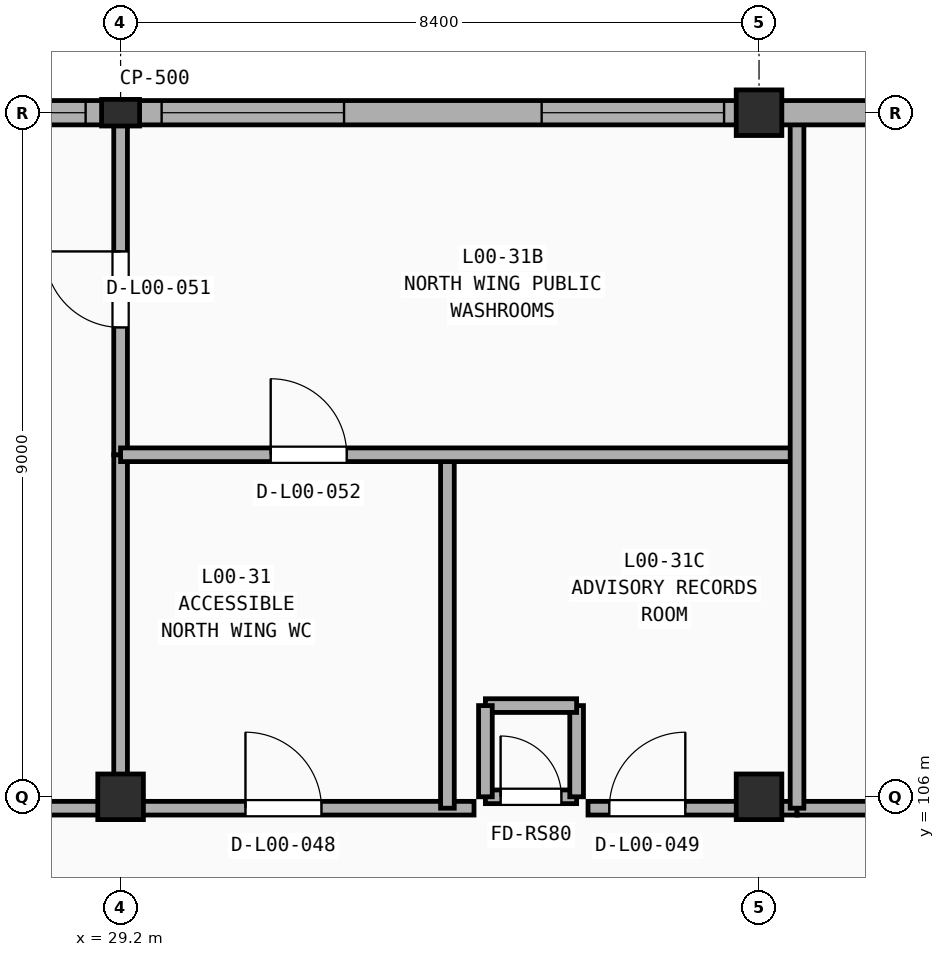
"""IFC4 building model, lengths in metres.
Left out: names, types, materials, properties, quantities, classifications, styles, units other than length and angle.
Written with IfcOpenShell. Run it as: python <this file> out.ifc"""

import sys

from ifc_helpers import new_model, si_unit, direction, frame, frame_2d, origin, origin_2d, place, context, subcontext, project, spatial, rectangle, extrude, element, fill, save


model = new_model("IFC4")
c1 = context("Model", 3, precision=1e-05, world=origin(), true_north=direction((0.0, 1.0)))
c2 = subcontext(c1, "Body", "Model", "MODEL_VIEW")
j1 = project(units=[si_unit("LENGTHUNIT", "METRE"), si_unit("PLANEANGLEUNIT", "RADIAN")], contexts=[c1])
p1 = place(None, origin())
s1 = spatial("IfcSite", under=j1, at=p1, CompositionType="ELEMENT")
p2 = place(p1, origin())
s2 = spatial("IfcBuilding", under=s1, at=p2, CompositionType="ELEMENT")
p3 = place(p2, origin())
s3 = spatial("IfcBuildingStorey", under=s2, at=p3, CompositionType="ELEMENT", Elevation=0.0)
p4 = place(p3, frame((29.2, 106.0, 0.0), z_axis=(0.0, 0.0, 1.0), x_axis=(1.0, 0.0, 0.0)))
e1 = element("IfcColumn", 1, at=p4, inside=s3, PredefinedType="COLUMN", context=c2, shape_type="SweptSolid", body=[
    extrude(rectangle(XDim=0.6, YDim=0.6, at=origin_2d()), origin(), (0.0, 0.0, 1.0), 5.4),
])
p5 = place(p3, frame((29.2, 115.0, 0.0), z_axis=(0.0, 0.0, 1.0), x_axis=(1.0, 0.0, 0.0)))
e2 = element("IfcColumn", 2, at=p5, inside=s3, PredefinedType="PILASTER", context=c2, shape_type="SweptSolid", body=[
    extrude(rectangle(XDim=0.5, YDim=0.35, at=origin_2d()), origin(), (0.0, 0.0, 1.0), 5.4),
])
for number, where, z_axis, x_axis in (
    (3, (37.6, 106.0, 0.0), (0.0, 0.0, 1.0), (1.0, 0.0, 0.0)),
    (4, (37.6, 115.0, 0.0), (0.0, 0.0, 1.0), (1.0, 0.0, 0.0)),
):
    element("IfcColumn", number, at=place(p3, frame(where, z_axis=z_axis, x_axis=x_axis)), inside=s3, PredefinedType="COLUMN", context=c2, shape_type="SweptSolid", body=[
        extrude(rectangle(XDim=0.6, YDim=0.6, at=origin_2d()), origin(), (0.0, 0.0, 1.0), 5.4),
    ])
p6 = place(p3, frame((4.15, 105.85, 0.0), z_axis=(0.0, 0.0, 1.0), x_axis=(1.0, 0.0, 0.0)))
e5 = element("IfcWall", 5, at=p6, inside=s3, PredefinedType="PARTITIONING", context=c2, shape_type="SweptSolid", body=[
    extrude(rectangle(XDim=25.05, YDim=0.18, at=frame_2d((12.525, 0.0))), origin(), (0.0, 0.0, 1.0), 4.54),
])
p7 = place(p6, frame((10.822, 0.0, -0.01)))
e6 = element("IfcOpeningElement", 6, at=p7, cuts=e5, PredefinedType="OPENING", context=c2, shape_type="SweptSolid", body=[
    extrude(rectangle(XDim=1.0, YDim=2.16, at=frame_2d((0.5, 1.08))), frame((0.0, 0.1, 0.0), z_axis=(0.0, -1.0, 0.0), x_axis=(1.0, 0.0, 0.0)), (0.0, 0.0, 1.0), 0.2),
])
p8 = place(p3, frame((29.2, 105.85, 0.0), z_axis=(0.0, 0.0, 1.0), x_axis=(1.0, 0.0, 0.0)))
e7 = element("IfcWall", 7, at=p8, inside=s3, PredefinedType="PARTITIONING", context=c2, shape_type="SweptSolid", body=[
    extrude(rectangle(XDim=4.65, YDim=0.18, at=frame_2d((2.325, 0.0))), origin(), (0.0, 0.0, 1.0), 4.54),
])
p9 = place(p8, frame((1.643, 0.0, -0.01)))
e8 = element("IfcOpeningElement", 8, at=p9, cuts=e7, PredefinedType="OPENING", context=c2, shape_type="SweptSolid", body=[
    extrude(rectangle(XDim=1.0, YDim=2.16, at=frame_2d((0.5, 1.08))), frame((0.0, 0.1, 0.0), z_axis=(0.0, -1.0, 0.0), x_axis=(1.0, 0.0, 0.0)), (0.0, 0.0, 1.0), 0.2),
])
p10 = place(p3, frame((35.35, 105.85, 0.0), z_axis=(0.0, 0.0, 1.0), x_axis=(1.0, 0.0, 0.0)))
e9 = element("IfcWall", 9, at=p10, inside=s3, PredefinedType="PARTITIONING", context=c2, shape_type="SweptSolid", body=[
    extrude(rectangle(XDim=2.75, YDim=0.18, at=frame_2d((1.375, 0.0))), origin(), (0.0, 0.0, 1.0), 4.54),
])
p11 = place(p10, frame((0.28, 0.0, -0.01)))
e10 = element("IfcOpeningElement", 10, at=p11, cuts=e9, PredefinedType="OPENING", context=c2, shape_type="SweptSolid", body=[
    extrude(rectangle(XDim=1.0, YDim=2.16, at=frame_2d((0.5, 1.08))), frame((0.0, 0.1, 0.0), z_axis=(0.0, -1.0, 0.0), x_axis=(1.0, 0.0, 0.0)), (0.0, 0.0, 1.0), 0.2),
])
p12 = place(p3, frame((38.1, 105.85, 0.0), z_axis=(0.0, 0.0, 1.0), x_axis=(1.0, 0.0, 0.0)))
e11 = element("IfcWall", 11, at=p12, inside=s3, PredefinedType="PARTITIONING", context=c2, shape_type="SweptSolid", body=[
    extrude(rectangle(XDim=13.9, YDim=0.18, at=frame_2d((6.95, 0.0))), origin(), (0.0, 0.0, 1.0), 4.54),
])
p13 = place(p12, frame((5.805, 0.0, -0.01)))
e12 = element("IfcOpeningElement", 12, at=p13, cuts=e11, PredefinedType="OPENING", context=c2, shape_type="SweptSolid", body=[
    extrude(rectangle(XDim=1.0, YDim=2.16, at=frame_2d((0.5, 1.08))), frame((0.0, 0.1, 0.0), z_axis=(0.0, -1.0, 0.0), x_axis=(1.0, 0.0, 0.0)), (0.0, 0.0, 1.0), 0.2),
])
p14 = place(p3, frame((29.2, 105.85, 0.0), z_axis=(0.0, 0.0, 1.0), x_axis=(0.0, 1.0, 0.0)))
e13 = element("IfcWall", 13, at=p14, inside=s3, PredefinedType="PARTITIONING", context=c2, shape_type="SweptSolid", body=[
    extrude(rectangle(XDim=4.65, YDim=0.18, at=frame_2d((2.325, 0.0))), origin(), (0.0, 0.0, 1.0), 4.54),
])
p15 = place(p3, frame((29.2, 110.5, 0.0), z_axis=(0.0, 0.0, 1.0), x_axis=(0.0, 1.0, 0.0)))
e14 = element("IfcWall", 14, at=p15, inside=s3, PredefinedType="PARTITIONING", context=c2, shape_type="SweptSolid", body=[
    extrude(rectangle(XDim=4.35, YDim=0.18, at=frame_2d((2.175, 0.0))), origin(), (0.0, 0.0, 1.0), 4.64),
])
p16 = place(p15, frame((1.675, 0.0, -0.01)))
e15 = element("IfcOpeningElement", 15, at=p16, cuts=e14, PredefinedType="OPENING", context=c2, shape_type="SweptSolid", body=[
    extrude(rectangle(XDim=1.0, YDim=2.16, at=frame_2d((0.5, 1.08))), frame((0.0, 0.1, 0.0), z_axis=(0.0, -1.0, 0.0), x_axis=(1.0, 0.0, 0.0)), (0.0, 0.0, 1.0), 0.2),
])
p17 = place(p3, frame((33.5, 105.85, 0.0), z_axis=(0.0, 0.0, 1.0), x_axis=(0.0, 1.0, 0.0)))
e16 = element("IfcWall", 16, at=p17, inside=s3, PredefinedType="PARTITIONING", context=c2, shape_type="SweptSolid", body=[
    extrude(rectangle(XDim=4.65, YDim=0.18, at=frame_2d((2.325, 0.0))), origin(), (0.0, 0.0, 1.0), 5.04),
])
p18 = place(p3, frame((29.2, 110.5, 0.0), z_axis=(0.0, 0.0, 1.0), x_axis=(1.0, 0.0, 0.0)))
e17 = element("IfcWall", 17, at=p18, inside=s3, PredefinedType="PARTITIONING", context=c2, shape_type="SweptSolid", body=[
    extrude(rectangle(XDim=8.9, YDim=0.18, at=frame_2d((4.45, 0.0))), origin(), (0.0, 0.0, 1.0), 4.64),
])
p19 = place(p18, frame((1.975, 0.0, -0.01)))
e18 = element("IfcOpeningElement", 18, at=p19, cuts=e17, PredefinedType="OPENING", context=c2, shape_type="SweptSolid", body=[
    extrude(rectangle(XDim=1.0, YDim=2.16, at=frame_2d((0.5, 1.08))), frame((0.0, 0.1, 0.0), z_axis=(0.0, -1.0, 0.0), x_axis=(1.0, 0.0, 0.0)), (0.0, 0.0, 1.0), 0.2),
])
p20 = place(p3, frame((38.1, 105.85, 0.0), z_axis=(0.0, 0.0, 1.0), x_axis=(0.0, 1.0, 0.0)))
e19 = element("IfcWall", 19, at=p20, inside=s3, PredefinedType="PARTITIONING", context=c2, shape_type="SweptSolid", body=[
    extrude(rectangle(XDim=9.0, YDim=0.18, at=frame_2d((4.5, 0.0))), origin(), (0.0, 0.0, 1.0), 4.54),
])
p21 = place(p3, frame((29.2, 115.0, 0.0), z_axis=(0.0, 0.0, 1.0), x_axis=(-1.0, 0.0, 0.0)))
e20 = element("IfcWall", 20, at=p21, inside=s3, PredefinedType="SOLIDWALL", context=c2, shape_type="SweptSolid", body=[
    extrude(rectangle(XDim=8.4, YDim=0.32, at=frame_2d((4.2, 0.0))), origin(), (0.0, 0.0, 1.0), 4.64),
])
p22 = place(p21, frame((0.46, 0.0, 0.9)))
e21 = element("IfcOpeningElement", 21, at=p22, cuts=e20, PredefinedType="OPENING", context=c2, shape_type="SweptSolid", body=[
    extrude(rectangle(XDim=2.4, YDim=2.35, at=frame_2d((1.2, 1.175))), frame((0.0, 0.17, 0.0), z_axis=(0.0, -1.0, 0.0), x_axis=(1.0, 0.0, 0.0)), (0.0, 0.0, 1.0), 0.34),
])
p23 = place(p21, frame((5.46, 0.0, 0.9)))
e22 = element("IfcOpeningElement", 22, at=p23, cuts=e20, PredefinedType="OPENING", context=c2, shape_type="SweptSolid", body=[
    extrude(rectangle(XDim=2.4, YDim=2.35, at=frame_2d((1.2, 1.175))), frame((0.0, 0.17, 0.0), z_axis=(0.0, -1.0, 0.0), x_axis=(1.0, 0.0, 0.0)), (0.0, 0.0, 1.0), 0.34),
])
p24 = place(p3, frame((37.6, 115.0, 0.0), z_axis=(0.0, 0.0, 1.0), x_axis=(-1.0, 0.0, 0.0)))
e23 = element("IfcWall", 23, at=p24, inside=s3, PredefinedType="SOLIDWALL", context=c2, shape_type="SweptSolid", body=[
    extrude(rectangle(XDim=8.4, YDim=0.32, at=frame_2d((4.2, 0.0))), origin(), (0.0, 0.0, 1.0), 4.64),
])
p25 = place(p24, frame((0.46, 0.0, 0.9)))
e24 = element("IfcOpeningElement", 24, at=p25, cuts=e23, PredefinedType="OPENING", context=c2, shape_type="SweptSolid", body=[
    extrude(rectangle(XDim=2.4, YDim=2.35, at=frame_2d((1.2, 1.175))), frame((0.0, 0.17, 0.0), z_axis=(0.0, -1.0, 0.0), x_axis=(1.0, 0.0, 0.0)), (0.0, 0.0, 1.0), 0.34),
])
p26 = place(p24, frame((5.46, 0.0, 0.9)))
e25 = element("IfcOpeningElement", 25, at=p26, cuts=e23, PredefinedType="OPENING", context=c2, shape_type="SweptSolid", body=[
    extrude(rectangle(XDim=2.4, YDim=2.35, at=frame_2d((1.2, 1.175))), frame((0.0, 0.17, 0.0), z_axis=(0.0, -1.0, 0.0), x_axis=(1.0, 0.0, 0.0)), (0.0, 0.0, 1.0), 0.34),
])
p27 = place(p3, frame((46.0, 115.0, 0.0), z_axis=(0.0, 0.0, 1.0), x_axis=(-1.0, 0.0, 0.0)))
e26 = element("IfcWall", 26, at=p27, inside=s3, PredefinedType="SOLIDWALL", context=c2, shape_type="SweptSolid", body=[
    extrude(rectangle(XDim=8.4, YDim=0.32, at=frame_2d((4.2, 0.0))), origin(), (0.0, 0.0, 1.0), 4.64),
])
p28 = place(p27, frame((3.2, 0.0, -0.01)))
e27 = element("IfcOpeningElement", 27, at=p28, cuts=e26, PredefinedType="OPENING", context=c2, shape_type="SweptSolid", body=[
    extrude(rectangle(XDim=2.0, YDim=2.41, at=frame_2d((1.0, 1.205))), frame((0.0, 0.17, 0.0), z_axis=(0.0, -1.0, 0.0), x_axis=(1.0, 0.0, 0.0)), (0.0, 0.0, 1.0), 0.34),
])
p29 = place(p3, frame((34.0, 106.0, 0.0), z_axis=(0.0, 0.0, 1.0), x_axis=(1.0, 0.0, 0.0)))
e28 = element("IfcWall", 28, at=p29, inside=s3, PredefinedType="SOLIDWALL", context=c2, shape_type="SweptSolid", body=[
    extrude(rectangle(XDim=1.2, YDim=0.18, at=frame_2d((0.6, 0.0))), origin(), (0.0, 0.0, 1.0), 5.07),
])
p30 = place(p29, frame((0.2, 0.0, -0.01)))
e29 = element("IfcOpeningElement", 29, at=p30, cuts=e28, PredefinedType="OPENING", context=c2, shape_type="SweptSolid", body=[
    extrude(rectangle(XDim=0.8, YDim=2.06, at=frame_2d((0.4, 1.03))), frame((0.0, 0.1, 0.0), z_axis=(0.0, -1.0, 0.0), x_axis=(1.0, 0.0, 0.0)), (0.0, 0.0, 1.0), 0.2),
])
for number, where, z_axis, x_axis in (
    (30, (35.2, 106.0, 0.0), (0.0, 0.0, 1.0), (0.0, 1.0, 0.0)),
    (31, (35.2, 107.2, 0.0), (0.0, 0.0, 1.0), (-1.0, 0.0, 0.0)),
    (32, (34.0, 107.2, 0.0), (0.0, 0.0, 1.0), (0.0, -1.0, 0.0)),
):
    element("IfcWall", number, at=place(p3, frame(where, z_axis=z_axis, x_axis=x_axis)), inside=s3, PredefinedType="SOLIDWALL", context=c2, shape_type="SweptSolid", body=[
        extrude(rectangle(XDim=1.2, YDim=0.18, at=frame_2d((0.6, 0.0))), origin(), (0.0, 0.0, 1.0), 5.07),
    ])
p31 = place(p9, frame((1.0, 0.0, 0.01), z_axis=(0.0, 0.0, 1.0), x_axis=(-1.0, 0.0, 0.0)))
e33 = element("IfcDoor", 33, at=p31, inside=s3, OperationType="SINGLE_SWING_LEFT", PredefinedType="DOOR", context=c2, shape_type="SweptSolid", body=[
    extrude(rectangle(XDim=1.0, YDim=2.15, at=frame_2d((0.5, 1.075))), frame((0.0, 0.025, 0.0), z_axis=(0.0, -1.0, 0.0), x_axis=(1.0, 0.0, 0.0)), (0.0, 0.0, 1.0), 0.05),
])
fill(e8, e33)
p32 = place(p11, frame((0.0, 0.0, 0.01)))
e34 = element("IfcDoor", 34, at=p32, inside=s3, OperationType="SINGLE_SWING_RIGHT", PredefinedType="DOOR", context=c2, shape_type="SweptSolid", body=[
    extrude(rectangle(XDim=1.0, YDim=2.15, at=frame_2d((0.5, 1.075))), frame((0.0, 0.025, 0.0), z_axis=(0.0, -1.0, 0.0), x_axis=(1.0, 0.0, 0.0)), (0.0, 0.0, 1.0), 0.05),
])
fill(e10, e34)
p33 = place(p16, frame((1.0, 0.0, 0.01), z_axis=(0.0, 0.0, 1.0), x_axis=(-1.0, 0.0, 0.0)))
e35 = element("IfcDoor", 35, at=p33, inside=s3, OperationType="SINGLE_SWING_RIGHT", PredefinedType="DOOR", context=c2, shape_type="SweptSolid", body=[
    extrude(rectangle(XDim=1.0, YDim=2.15, at=frame_2d((0.5, 1.075))), frame((0.0, 0.025, 0.0), z_axis=(0.0, -1.0, 0.0), x_axis=(1.0, 0.0, 0.0)), (0.0, 0.0, 1.0), 0.05),
])
fill(e15, e35)
p34 = place(p19, frame((0.0, 0.0, 0.01)))
e36 = element("IfcDoor", 36, at=p34, inside=s3, OperationType="SINGLE_SWING_LEFT", PredefinedType="DOOR", context=c2, shape_type="SweptSolid", body=[
    extrude(rectangle(XDim=1.0, YDim=2.15, at=frame_2d((0.5, 1.075))), frame((0.0, 0.025, 0.0), z_axis=(0.0, -1.0, 0.0), x_axis=(1.0, 0.0, 0.0)), (0.0, 0.0, 1.0), 0.05),
])
fill(e18, e36)
p35 = place(p22, origin())
e37 = element("IfcWindow", 37, at=p35, inside=s3, PartitioningType="TRIPLE_PANEL_VERTICAL", PredefinedType="WINDOW", context=c2, shape_type="SweptSolid", body=[
    extrude(rectangle(XDim=2.4, YDim=2.35, at=frame_2d((1.2, 1.175))), frame((0.0, 0.03, 0.0), z_axis=(0.0, -1.0, 0.0), x_axis=(1.0, 0.0, 0.0)), (0.0, 0.0, 1.0), 0.06),
])
fill(e21, e37)
p36 = place(p25, origin())
e38 = element("IfcWindow", 38, at=p36, inside=s3, PartitioningType="TRIPLE_PANEL_VERTICAL", PredefinedType="WINDOW", context=c2, shape_type="SweptSolid", body=[
    extrude(rectangle(XDim=2.4, YDim=2.35, at=frame_2d((1.2, 1.175))), frame((0.0, 0.03, 0.0), z_axis=(0.0, -1.0, 0.0), x_axis=(1.0, 0.0, 0.0)), (0.0, 0.0, 1.0), 0.06),
])
fill(e24, e38)
p37 = place(p26, origin())
e39 = element("IfcWindow", 39, at=p37, inside=s3, PartitioningType="TRIPLE_PANEL_VERTICAL", PredefinedType="WINDOW", context=c2, shape_type="SweptSolid", body=[
    extrude(rectangle(XDim=2.4, YDim=2.35, at=frame_2d((1.2, 1.175))), frame((0.0, 0.03, 0.0), z_axis=(0.0, -1.0, 0.0), x_axis=(1.0, 0.0, 0.0)), (0.0, 0.0, 1.0), 0.06),
])
fill(e25, e39)
p38 = place(p30, frame((0.0, 0.0, 0.01)))
e40 = element("IfcDoor", 40, at=p38, inside=s3, OperationType="SINGLE_SWING_LEFT", PredefinedType="DOOR", context=c2, shape_type="SweptSolid", body=[
    extrude(rectangle(XDim=0.8, YDim=2.05, at=frame_2d((0.4, 1.025))), frame((0.0, 0.025, 0.0), z_axis=(0.0, -1.0, 0.0), x_axis=(1.0, 0.0, 0.0)), (0.0, 0.0, 1.0), 0.05),
])
fill(e29, e40)
save(model, sys.argv[1])
